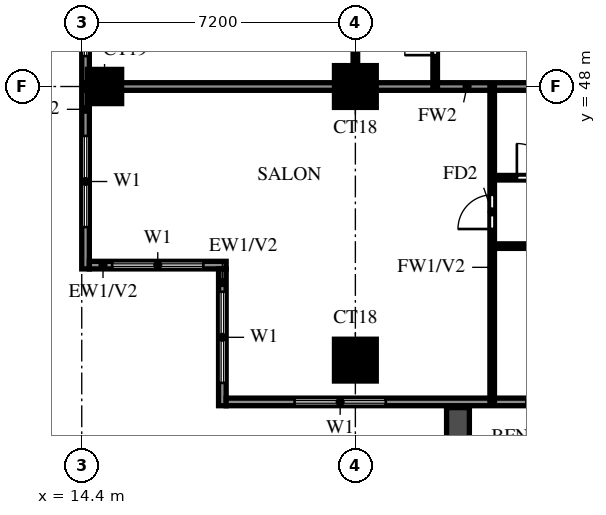
"""IFC4 building model, lengths in metres.
Left out: names, types, materials, properties, quantities, classifications, styles, units other than length and angle.
Written with IfcOpenShell. Run it as: python <this file> out.ifc"""

import sys

from ifc_helpers import new_model, si_unit, direction, frame, frame_2d, origin, origin_2d, place, context, subcontext, project, spatial, rectangle, extrude, source, transform, mapped, element, fill, save


model = new_model("IFC4")
c1 = context("Model", 3, precision=1e-05, world=origin(), true_north=direction((0.0, 1.0)))
c2 = subcontext(c1, "Body", "Model", "MODEL_VIEW")
j1 = project(units=[si_unit("LENGTHUNIT", "METRE"), si_unit("PLANEANGLEUNIT", "RADIAN")], contexts=[c1])
p1 = place(None, origin())
s1 = spatial("IfcSite", under=j1, at=p1, CompositionType="ELEMENT")
p2 = place(p1, origin())
s2 = spatial("IfcBuilding", under=s1, at=p2, CompositionType="ELEMENT")
p3 = place(p2, frame((0.0, 0.0, 120.0)))
s3 = spatial("IfcBuildingStorey", under=s2, at=p3, CompositionType="ELEMENT", Elevation=120.0)
m1 = source(origin(), c2, "Body", "SweptSolid", [
    extrude(rectangle(XDim=1.1, YDim=1.1, at=origin_2d()), origin(), (0.0, 0.0, 1.0), 3.2),
])
p4 = place(p3, frame((21.6, 40.8, 0.0), z_axis=(0.0, 0.0, 1.0), x_axis=(1.0, 0.0, 0.0)))
e1 = element("IfcColumn", 1, at=p4, inside=s3, PredefinedType="COLUMN", context=c2, shape_type="MappedRepresentation", body=[
    mapped(m1, transform((0.0, 0.0, 0.0))),
])
m2 = source(origin(), c2, "Body", "SweptSolid", [
    extrude(rectangle(XDim=0.9, YDim=0.9, at=origin_2d()), origin(), (0.0, 0.0, 1.0), 3.2),
])
p5 = place(p3, frame((15.0, 48.0, 0.0), z_axis=(0.0, 0.0, 1.0), x_axis=(1.0, 0.0, 0.0)))
e2 = element("IfcColumn", 2, at=p5, inside=s3, PredefinedType="COLUMN", context=c2, shape_type="MappedRepresentation", body=[
    mapped(m2, transform((0.0, 0.0, 0.0))),
])
p6 = place(p3, frame((21.6, 48.0, 0.0), z_axis=(0.0, 0.0, 1.0), x_axis=(1.0, 0.0, 0.0)))
e3 = element("IfcColumn", 3, at=p6, inside=s3, PredefinedType="COLUMN", context=c2, shape_type="MappedRepresentation", body=[
    mapped(m1, transform((0.0, 0.0, 0.0))),
])
p7 = place(p3, frame((14.5, 55.2, 0.0), z_axis=(0.0, 0.0, 1.0), x_axis=(0.0, -1.0, 0.0)))
e4 = element("IfcWall", 4, at=p7, inside=s3, PredefinedType="SOLIDWALL", context=c2, shape_type="SweptSolid", body=[
    extrude(rectangle(XDim=12.0, YDim=0.2, at=frame_2d((6.0, 0.0))), origin(), (0.0, 0.0, 1.0), 3.2),
])
p8 = place(p7, frame((8.5, 0.0, 0.6)))
e5 = element("IfcOpeningElement", 5, at=p8, cuts=e4, PredefinedType="OPENING", context=c2, shape_type="SweptSolid", body=[
    extrude(rectangle(XDim=2.4, YDim=2.4, at=frame_2d((1.2, 1.2))), frame((0.0, 0.11, 0.0), z_axis=(0.0, -1.0, 0.0), x_axis=(1.0, 0.0, 0.0)), (0.0, 0.0, 1.0), 0.22),
])
p9 = place(p7, frame((4.0, 0.0, 0.6)))
e6 = element("IfcOpeningElement", 6, at=p9, cuts=e4, PredefinedType="OPENING", context=c2, shape_type="SweptSolid", body=[
    extrude(rectangle(XDim=2.4, YDim=2.4, at=frame_2d((1.2, 1.2))), frame((0.0, 0.11, 0.0), z_axis=(0.0, -1.0, 0.0), x_axis=(1.0, 0.0, 0.0)), (0.0, 0.0, 1.0), 0.22),
])
p10 = place(p7, frame((1.1, 0.0, 0.6)))
e7 = element("IfcOpeningElement", 7, at=p10, cuts=e4, PredefinedType="OPENING", context=c2, shape_type="SweptSolid", body=[
    extrude(rectangle(XDim=1.8, YDim=2.4, at=frame_2d((0.9, 1.2))), frame((0.0, 0.11, 0.0), z_axis=(0.0, -1.0, 0.0), x_axis=(1.0, 0.0, 0.0)), (0.0, 0.0, 1.0), 0.22),
])
p11 = place(p3, frame((14.6, 43.3, 0.0), z_axis=(0.0, 0.0, 1.0), x_axis=(1.0, 0.0, 0.0)))
e8 = element("IfcWall", 8, at=p11, inside=s3, PredefinedType="SOLIDWALL", context=c2, shape_type="SweptSolid", body=[
    extrude(rectangle(XDim=3.6, YDim=0.2, at=frame_2d((1.8, 0.0))), origin(), (0.0, 0.0, 1.0), 3.2),
])
p12 = place(p11, frame((0.6, 0.0, 0.6)))
e9 = element("IfcOpeningElement", 9, at=p12, cuts=e8, PredefinedType="OPENING", context=c2, shape_type="SweptSolid", body=[
    extrude(rectangle(XDim=2.4, YDim=2.4, at=frame_2d((1.2, 1.2))), frame((0.0, 0.11, 0.0), z_axis=(0.0, -1.0, 0.0), x_axis=(1.0, 0.0, 0.0)), (0.0, 0.0, 1.0), 0.22),
])
p13 = place(p3, frame((18.1, 43.2, 0.0), z_axis=(0.0, 0.0, 1.0), x_axis=(0.0, -1.0, 0.0)))
e10 = element("IfcWall", 10, at=p13, inside=s3, PredefinedType="SOLIDWALL", context=c2, shape_type="SweptSolid", body=[
    extrude(rectangle(XDim=3.6, YDim=0.2, at=frame_2d((1.8, 0.0))), origin(), (0.0, 0.0, 1.0), 3.2),
])
p14 = place(p13, frame((0.6, 0.0, 0.6)))
e11 = element("IfcOpeningElement", 11, at=p14, cuts=e10, PredefinedType="OPENING", context=c2, shape_type="SweptSolid", body=[
    extrude(rectangle(XDim=2.4, YDim=2.4, at=frame_2d((1.2, 1.2))), frame((0.0, 0.11, 0.0), z_axis=(0.0, -1.0, 0.0), x_axis=(1.0, 0.0, 0.0)), (0.0, 0.0, 1.0), 0.22),
])
p15 = place(p3, frame((18.2, 39.7, 0.0), z_axis=(0.0, 0.0, 1.0), x_axis=(1.0, 0.0, 0.0)))
e12 = element("IfcWall", 12, at=p15, inside=s3, PredefinedType="SOLIDWALL", context=c2, shape_type="SweptSolid", body=[
    extrude(rectangle(XDim=23.8, YDim=0.2, at=frame_2d((11.9, 0.0))), origin(), (0.0, 0.0, 1.0), 3.2),
])
p16 = place(p15, frame((7.9, 0.0, 0.0)))
e13 = element("IfcOpeningElement", 13, at=p16, cuts=e12, PredefinedType="OPENING", context=c2, shape_type="SweptSolid", body=[
    extrude(rectangle(XDim=1.8, YDim=2.4, at=frame_2d((0.9, 1.2))), frame((0.0, 0.11, 0.0), z_axis=(0.0, -1.0, 0.0), x_axis=(1.0, 0.0, 0.0)), (0.0, 0.0, 1.0), 0.22),
])
p17 = place(p15, frame((1.8, 0.0, 0.6)))
e14 = element("IfcOpeningElement", 14, at=p17, cuts=e12, PredefinedType="OPENING", context=c2, shape_type="SweptSolid", body=[
    extrude(rectangle(XDim=2.4, YDim=2.4, at=frame_2d((1.2, 1.2))), frame((0.0, 0.11, 0.0), z_axis=(0.0, -1.0, 0.0), x_axis=(1.0, 0.0, 0.0)), (0.0, 0.0, 1.0), 0.22),
])
p18 = place(p15, frame((10.9, 0.0, 0.6)))
e15 = element("IfcOpeningElement", 15, at=p18, cuts=e12, PredefinedType="OPENING", context=c2, shape_type="SweptSolid", body=[
    extrude(rectangle(XDim=1.2, YDim=2.4, at=frame_2d((0.6, 1.2))), frame((0.0, 0.11, 0.0), z_axis=(0.0, -1.0, 0.0), x_axis=(1.0, 0.0, 0.0)), (0.0, 0.0, 1.0), 0.22),
])
p19 = place(p15, frame((13.3, 0.0, 0.6)))
e16 = element("IfcOpeningElement", 16, at=p19, cuts=e12, PredefinedType="OPENING", context=c2, shape_type="SweptSolid", body=[
    extrude(rectangle(XDim=1.8, YDim=2.4, at=frame_2d((0.9, 1.2))), frame((0.0, 0.11, 0.0), z_axis=(0.0, -1.0, 0.0), x_axis=(1.0, 0.0, 0.0)), (0.0, 0.0, 1.0), 0.22),
])
p20 = place(p3, frame((24.3, 39.55, 0.0), z_axis=(0.0, 0.0, 1.0), x_axis=(0.0, -1.0, 0.0)))
e17 = element("IfcWall", 17, at=p20, inside=s3, PredefinedType="SOLIDWALL", context=c2, shape_type="SweptSolid", body=[
    extrude(rectangle(XDim=2.65, YDim=0.6, at=frame_2d((1.325, 0.0))), origin(), (0.0, 0.0, 1.0), 2.85),
])
p21 = place(p3, frame((14.525, 48.0, 0.0), z_axis=(0.0, 0.0, 1.0), x_axis=(1.0, 0.0, 0.0)))
e18 = element("IfcWall", 18, at=p21, inside=s3, PredefinedType="SOLIDWALL", context=c2, shape_type="SweptSolid", body=[
    extrude(rectangle(XDim=19.075, YDim=0.2, at=frame_2d((9.538, 0.0))), origin(), (0.0, 0.0, 1.0), 3.2),
])
p22 = place(p3, frame((25.2, 43.8, 0.0), z_axis=(0.0, 0.0, 1.0), x_axis=(1.0, 0.0, 0.0)))
e19 = element("IfcWall", 19, at=p22, inside=s3, PredefinedType="PARTITIONING", context=c2, shape_type="SweptSolid", body=[
    extrude(rectangle(XDim=8.4, YDim=0.12, at=frame_2d((4.2, 0.0))), origin(), (0.0, 0.0, 1.0), 3.2),
])
p23 = place(p22, frame((1.35, 0.0, 0.0)))
e20 = element("IfcOpeningElement", 20, at=p23, cuts=e19, PredefinedType="OPENING", context=c2, shape_type="SweptSolid", body=[
    extrude(rectangle(XDim=0.9, YDim=2.1, at=frame_2d((0.45, 1.05))), frame((0.0, 0.07, 0.0), z_axis=(0.0, -1.0, 0.0), x_axis=(1.0, 0.0, 0.0)), (0.0, 0.0, 1.0), 0.14),
])
p24 = place(p22, frame((5.55, 0.0, 0.0)))
e21 = element("IfcOpeningElement", 21, at=p24, cuts=e19, PredefinedType="OPENING", context=c2, shape_type="SweptSolid", body=[
    extrude(rectangle(XDim=0.9, YDim=2.1, at=frame_2d((0.45, 1.05))), frame((0.0, 0.07, 0.0), z_axis=(0.0, -1.0, 0.0), x_axis=(1.0, 0.0, 0.0)), (0.0, 0.0, 1.0), 0.14),
])
p25 = place(p3, frame((25.2, 45.6, 0.0), z_axis=(0.0, 0.0, 1.0), x_axis=(1.0, 0.0, 0.0)))
e22 = element("IfcWall", 22, at=p25, inside=s3, PredefinedType="PARTITIONING", context=c2, shape_type="SweptSolid", body=[
    extrude(rectangle(XDim=6.0, YDim=0.12, at=frame_2d((3.0, 0.0))), origin(), (0.0, 0.0, 1.0), 3.2),
])
p26 = place(p25, frame((0.65, 0.0, 0.0)))
e23 = element("IfcOpeningElement", 23, at=p26, cuts=e22, PredefinedType="OPENING", context=c2, shape_type="SweptSolid", body=[
    extrude(rectangle(XDim=0.9, YDim=2.1, at=frame_2d((0.45, 1.05))), frame((0.0, 0.07, 0.0), z_axis=(0.0, -1.0, 0.0), x_axis=(1.0, 0.0, 0.0)), (0.0, 0.0, 1.0), 0.14),
])
p27 = place(p25, frame((3.65, 0.0, 0.0)))
e24 = element("IfcOpeningElement", 24, at=p27, cuts=e22, PredefinedType="OPENING", context=c2, shape_type="SweptSolid", body=[
    extrude(rectangle(XDim=0.9, YDim=2.1, at=frame_2d((0.45, 1.05))), frame((0.0, 0.07, 0.0), z_axis=(0.0, -1.0, 0.0), x_axis=(1.0, 0.0, 0.0)), (0.0, 0.0, 1.0), 0.14),
])
p28 = place(p3, frame((21.6, 48.0, 0.0), z_axis=(0.0, 0.0, 1.0), x_axis=(0.0, 1.0, 0.0)))
e25 = element("IfcWall", 25, at=p28, inside=s3, PredefinedType="PARTITIONING", context=c2, shape_type="SweptSolid", body=[
    extrude(rectangle(XDim=21.6, YDim=0.12, at=frame_2d((10.8, 0.0))), origin(), (0.0, 0.0, 1.0), 3.2),
])
p29 = place(p28, frame((1.35, 0.0, 0.0)))
e26 = element("IfcOpeningElement", 26, at=p29, cuts=e25, PredefinedType="OPENING", context=c2, shape_type="SweptSolid", body=[
    extrude(rectangle(XDim=0.9, YDim=2.1, at=frame_2d((0.45, 1.05))), frame((0.0, 0.07, 0.0), z_axis=(0.0, -1.0, 0.0), x_axis=(1.0, 0.0, 0.0)), (0.0, 0.0, 1.0), 0.14),
])
p30 = place(p28, frame((7.95, 0.0, 0.0)))
e27 = element("IfcOpeningElement", 27, at=p30, cuts=e25, PredefinedType="OPENING", context=c2, shape_type="SweptSolid", body=[
    extrude(rectangle(XDim=1.5, YDim=2.1, at=frame_2d((0.75, 1.05))), frame((0.0, 0.07, 0.0), z_axis=(0.0, -1.0, 0.0), x_axis=(1.0, 0.0, 0.0)), (0.0, 0.0, 1.0), 0.14),
])
p31 = place(p28, frame((12.15, 0.0, 0.0)))
e28 = element("IfcOpeningElement", 28, at=p31, cuts=e25, PredefinedType="OPENING", context=c2, shape_type="SweptSolid", body=[
    extrude(rectangle(XDim=0.9, YDim=2.1, at=frame_2d((0.45, 1.05))), frame((0.0, 0.07, 0.0), z_axis=(0.0, -1.0, 0.0), x_axis=(1.0, 0.0, 0.0)), (0.0, 0.0, 1.0), 0.14),
])
p32 = place(p28, frame((15.75, 0.0, 0.0)))
e29 = element("IfcOpeningElement", 29, at=p32, cuts=e25, PredefinedType="OPENING", context=c2, shape_type="SweptSolid", body=[
    extrude(rectangle(XDim=0.9, YDim=2.1, at=frame_2d((0.45, 1.05))), frame((0.0, 0.07, 0.0), z_axis=(0.0, -1.0, 0.0), x_axis=(1.0, 0.0, 0.0)), (0.0, 0.0, 1.0), 0.14),
])
p33 = place(p28, frame((19.35, 0.0, 0.0)))
e30 = element("IfcOpeningElement", 30, at=p33, cuts=e25, PredefinedType="OPENING", context=c2, shape_type="SweptSolid", body=[
    extrude(rectangle(XDim=0.9, YDim=2.1, at=frame_2d((0.45, 1.05))), frame((0.0, 0.07, 0.0), z_axis=(0.0, -1.0, 0.0), x_axis=(1.0, 0.0, 0.0)), (0.0, 0.0, 1.0), 0.14),
])
p34 = place(p3, frame((23.7, 48.0, 0.0), z_axis=(0.0, 0.0, 1.0), x_axis=(0.0, 1.0, 0.0)))
e31 = element("IfcWall", 31, at=p34, inside=s3, PredefinedType="PARTITIONING", context=c2, shape_type="SweptSolid", body=[
    extrude(rectangle(XDim=7.2, YDim=0.12, at=frame_2d((3.6, 0.0))), origin(), (0.0, 0.0, 1.0), 3.2),
])
p35 = place(p34, frame((0.825, 0.0, 0.0)))
e32 = element("IfcOpeningElement", 32, at=p35, cuts=e31, PredefinedType="OPENING", context=c2, shape_type="SweptSolid", body=[
    extrude(rectangle(XDim=0.8, YDim=2.1, at=frame_2d((0.4, 1.05))), frame((0.0, 0.07, 0.0), z_axis=(0.0, -1.0, 0.0), x_axis=(1.0, 0.0, 0.0)), (0.0, 0.0, 1.0), 0.14),
])
p36 = place(p3, frame((25.2, 39.725, 0.0), z_axis=(0.0, 0.0, 1.0), x_axis=(0.0, 1.0, 0.0)))
e33 = element("IfcWall", 33, at=p36, inside=s3, PredefinedType="PARTITIONING", context=c2, shape_type="SweptSolid", body=[
    extrude(rectangle(XDim=8.275, YDim=0.12, at=frame_2d((4.137, 0.0))), origin(), (0.0, 0.0, 1.0), 3.2),
])
p37 = place(p36, frame((4.525, 0.0, 0.0)))
e34 = element("IfcOpeningElement", 34, at=p37, cuts=e33, PredefinedType="OPENING", context=c2, shape_type="SweptSolid", body=[
    extrude(rectangle(XDim=0.9, YDim=2.1, at=frame_2d((0.45, 1.05))), frame((0.0, 0.07, 0.0), z_axis=(0.0, -1.0, 0.0), x_axis=(1.0, 0.0, 0.0)), (0.0, 0.0, 1.0), 0.14),
])
p38 = place(p8, origin())
e35 = element("IfcWindow", 35, at=p38, inside=s3, PartitioningType="DOUBLE_PANEL_VERTICAL", PredefinedType="WINDOW", context=c2, shape_type="SweptSolid", body=[
    extrude(rectangle(XDim=2.4, YDim=2.4, at=frame_2d((1.2, 1.2))), frame((0.0, 0.03, 0.0), z_axis=(0.0, -1.0, 0.0), x_axis=(1.0, 0.0, 0.0)), (0.0, 0.0, 1.0), 0.06),
])
fill(e5, e35)
p39 = place(p9, origin())
e36 = element("IfcWindow", 36, at=p39, inside=s3, PartitioningType="DOUBLE_PANEL_VERTICAL", PredefinedType="WINDOW", context=c2, shape_type="SweptSolid", body=[
    extrude(rectangle(XDim=2.4, YDim=2.4, at=frame_2d((1.2, 1.2))), frame((0.0, 0.03, 0.0), z_axis=(0.0, -1.0, 0.0), x_axis=(1.0, 0.0, 0.0)), (0.0, 0.0, 1.0), 0.06),
])
fill(e6, e36)
p40 = place(p12, origin())
e37 = element("IfcWindow", 37, at=p40, inside=s3, PartitioningType="DOUBLE_PANEL_VERTICAL", PredefinedType="WINDOW", context=c2, shape_type="SweptSolid", body=[
    extrude(rectangle(XDim=2.4, YDim=2.4, at=frame_2d((1.2, 1.2))), frame((0.0, 0.03, 0.0), z_axis=(0.0, -1.0, 0.0), x_axis=(1.0, 0.0, 0.0)), (0.0, 0.0, 1.0), 0.06),
])
fill(e9, e37)
p41 = place(p14, origin())
e38 = element("IfcWindow", 38, at=p41, inside=s3, PartitioningType="DOUBLE_PANEL_VERTICAL", PredefinedType="WINDOW", context=c2, shape_type="SweptSolid", body=[
    extrude(rectangle(XDim=2.4, YDim=2.4, at=frame_2d((1.2, 1.2))), frame((0.0, 0.03, 0.0), z_axis=(0.0, -1.0, 0.0), x_axis=(1.0, 0.0, 0.0)), (0.0, 0.0, 1.0), 0.06),
])
fill(e11, e38)
p42 = place(p16, origin())
e39 = element("IfcDoor", 39, at=p42, inside=s3, OperationType="DOUBLE_DOOR_SLIDING", PredefinedType="DOOR", context=c2, shape_type="SweptSolid", body=[
    extrude(rectangle(XDim=1.8, YDim=2.4, at=frame_2d((0.9, 1.2))), frame((0.0, 0.025, 0.0), z_axis=(0.0, -1.0, 0.0), x_axis=(1.0, 0.0, 0.0)), (0.0, 0.0, 1.0), 0.05),
])
fill(e13, e39)
p43 = place(p17, origin())
e40 = element("IfcWindow", 40, at=p43, inside=s3, PartitioningType="DOUBLE_PANEL_VERTICAL", PredefinedType="WINDOW", context=c2, shape_type="SweptSolid", body=[
    extrude(rectangle(XDim=2.4, YDim=2.4, at=frame_2d((1.2, 1.2))), frame((0.0, 0.03, 0.0), z_axis=(0.0, -1.0, 0.0), x_axis=(1.0, 0.0, 0.0)), (0.0, 0.0, 1.0), 0.06),
])
fill(e14, e40)
p44 = place(p37, origin())
e41 = element("IfcDoor", 41, at=p44, inside=s3, OperationType="SINGLE_SWING_LEFT", PredefinedType="DOOR", context=c2, shape_type="SweptSolid", body=[
    extrude(rectangle(XDim=0.9, YDim=2.1, at=frame_2d((0.45, 1.05))), frame((0.0, 0.025, 0.0), z_axis=(0.0, -1.0, 0.0), x_axis=(1.0, 0.0, 0.0)), (0.0, 0.0, 1.0), 0.05),
])
fill(e34, e41)
p45 = place(p26, origin())
e42 = element("IfcDoor", 42, at=p45, inside=s3, OperationType="SINGLE_SWING_LEFT", PredefinedType="DOOR", context=c2, shape_type="SweptSolid", body=[
    extrude(rectangle(XDim=0.9, YDim=2.1, at=frame_2d((0.45, 1.05))), frame((0.0, 0.025, 0.0), z_axis=(0.0, -1.0, 0.0), x_axis=(1.0, 0.0, 0.0)), (0.0, 0.0, 1.0), 0.05),
])
fill(e23, e42)
p46 = place(p35, origin())
e43 = element("IfcDoor", 43, at=p46, inside=s3, OperationType="SINGLE_SWING_RIGHT", PredefinedType="DOOR", context=c2, shape_type="SweptSolid", body=[
    extrude(rectangle(XDim=0.8, YDim=2.1, at=frame_2d((0.4, 1.05))), frame((0.0, 0.025, 0.0), z_axis=(0.0, -1.0, 0.0), x_axis=(1.0, 0.0, 0.0)), (0.0, 0.0, 1.0), 0.05),
])
fill(e32, e43)
save(model, sys.argv[1])
